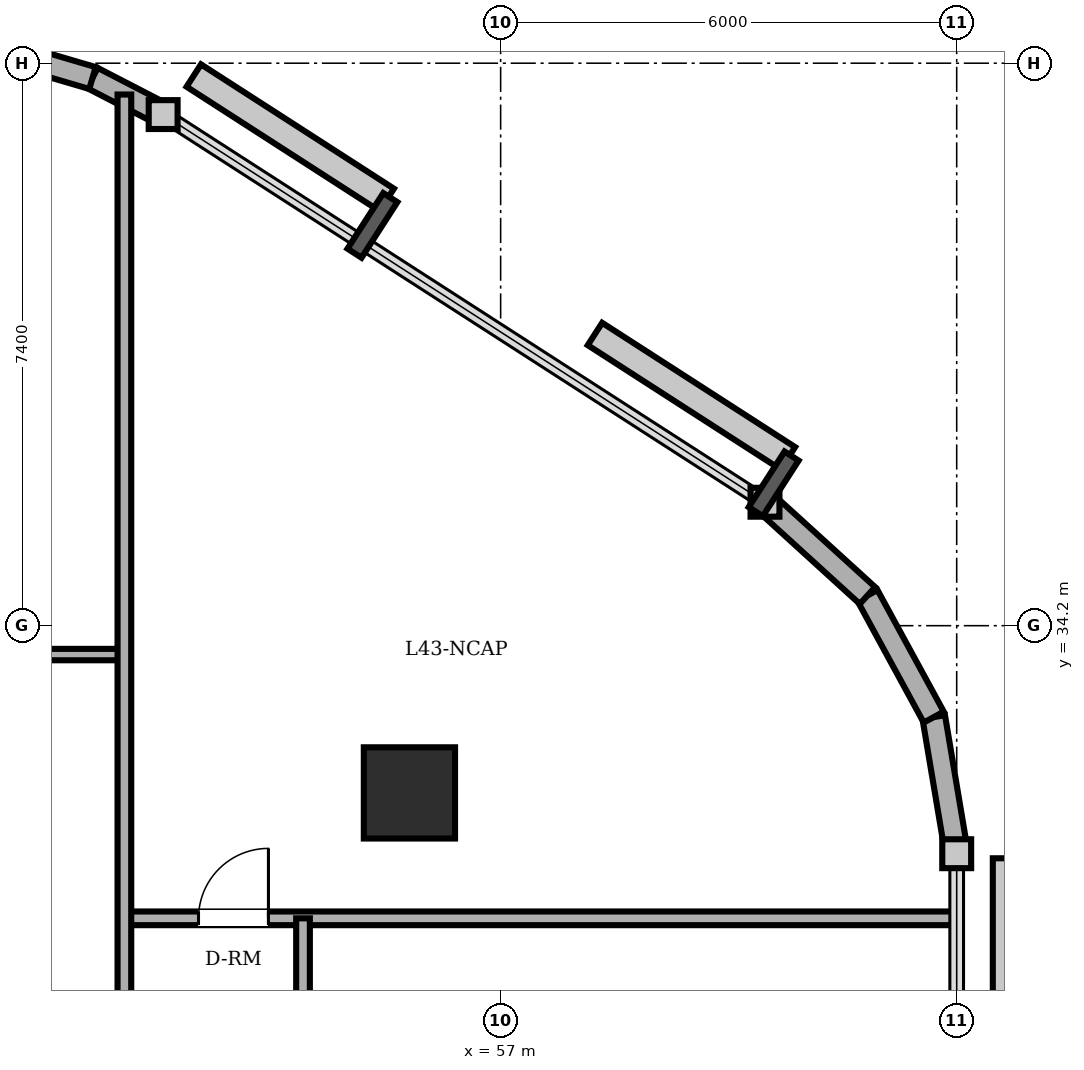
"""IFC4 building model, lengths in metres.
Left out: names, types, materials, properties, quantities, classifications, styles, units other than length and angle.
Written with IfcOpenShell. Run it as: python <this file> out.ifc"""

import sys

from ifc_helpers import new_model, si_unit, direction, frame, frame_2d, origin, origin_2d, place, context, subcontext, project, spatial, rectangle, circle, extrude, element, fill, save


model = new_model("IFC4")
c1 = context("Model", 3, precision=1e-05, world=origin(), true_north=direction((0.0, 1.0)))
c2 = subcontext(c1, "Body", "Model", "MODEL_VIEW")
j1 = project(units=[si_unit("LENGTHUNIT", "METRE"), si_unit("PLANEANGLEUNIT", "RADIAN")], contexts=[c1])
p1 = place(None, origin())
s1 = spatial("IfcSite", under=j1, at=p1, CompositionType="ELEMENT")
p2 = place(p1, origin())
s2 = spatial("IfcBuilding", under=s1, at=p2, CompositionType="ELEMENT")
p3 = place(p2, frame((0.0, 0.0, 165.4)))
s3 = spatial("IfcBuildingStorey", under=s2, at=p3, CompositionType="ELEMENT", Elevation=165.4)
p4 = place(p3, frame((55.8, 32.0, 0.0), z_axis=(0.0, 0.0, 1.0), x_axis=(1.0, 0.0, 0.0)))
e1 = element("IfcColumn", 1, at=p4, inside=s3, PredefinedType="COLUMN", context=c2, shape_type="SweptSolid", body=[
    extrude(circle(Radius=0.6, at=origin_2d()), origin(), (0.0, 0.0, 1.0), 3.6),
])
p5 = place(p3, frame((63.0, 31.2, 0.0), z_axis=(0.0, 0.0, 1.0), x_axis=(-0.165724081207, 0.986172159873, 0.0)))
e2 = element("IfcWall", 2, at=p5, inside=s3, PredefinedType="SOLIDWALL", context=c2, shape_type="SweptSolid", body=[
    extrude(rectangle(XDim=1.822, YDim=0.3, at=frame_2d((0.911, 0.0))), origin(), (0.0, 0.0, 1.0), 3.4),
])
p6 = place(p3, frame((62.698, 32.997, 0.0), z_axis=(0.0, 0.0, 1.0), x_axis=(-0.478608030646, 0.878028674362, 0.0)))
e3 = element("IfcWall", 3, at=p6, inside=s3, PredefinedType="SOLIDWALL", context=c2, shape_type="SweptSolid", body=[
    extrude(rectangle(XDim=1.822, YDim=0.3, at=frame_2d((0.911, 0.0))), origin(), (0.0, 0.0, 1.0), 3.4),
])
p7 = place(p3, frame((61.826, 34.597, 0.0), z_axis=(0.0, 0.0, 1.0), x_axis=(-0.73947929393, 0.673179302897, 0.0)))
e4 = element("IfcWall", 4, at=p7, inside=s3, PredefinedType="SOLIDWALL", context=c2, shape_type="SweptSolid", body=[
    extrude(rectangle(XDim=1.823, YDim=0.3, at=frame_2d((0.911, 0.0))), origin(), (0.0, 0.0, 1.0), 3.4),
])
p8 = place(p3, frame((52.56, 40.924, 0.0), z_axis=(0.0, 0.0, 1.0), x_axis=(-0.888283247196, 0.459296062198, 0.0)))
e5 = element("IfcWall", 5, at=p8, inside=s3, PredefinedType="SOLIDWALL", context=c2, shape_type="SweptSolid", body=[
    extrude(rectangle(XDim=1.047, YDim=0.3, at=frame_2d((0.523, 0.0))), origin(), (0.0, 0.0, 1.0), 3.4),
])
p9 = place(p3, frame((51.63, 41.405, 0.0), z_axis=(0.0, 0.0, 1.0), x_axis=(-0.959528674476, 0.281610942363, 0.0)))
e6 = element("IfcWall", 6, at=p9, inside=s3, PredefinedType="SOLIDWALL", context=c2, shape_type="SweptSolid", body=[
    extrude(rectangle(XDim=1.047, YDim=0.3, at=frame_2d((0.524, 0.0))), origin(), (0.0, 0.0, 1.0), 3.4),
])
p10 = place(p3, frame((52.05, 30.35, 0.0), z_axis=(0.0, 0.0, 1.0), x_axis=(1.0, 0.0, 0.0)))
e7 = element("IfcWall", 7, at=p10, inside=s3, PredefinedType="PARTITIONING", context=c2, shape_type="SweptSolid", body=[
    extrude(rectangle(XDim=10.95, YDim=0.18, at=frame_2d((5.475, 0.0))), origin(), (0.0, 0.0, 1.0), 3.4),
])
p11 = place(p10, frame((0.975, 0.0, 0.0)))
e8 = element("IfcOpeningElement", 8, at=p11, cuts=e7, PredefinedType="OPENING", context=c2, shape_type="SweptSolid", body=[
    extrude(rectangle(XDim=0.92, YDim=2.1, at=frame_2d((0.46, 1.05))), frame((0.0, 0.1, 0.0), z_axis=(0.0, -1.0, 0.0), x_axis=(1.0, 0.0, 0.0)), (0.0, 0.0, 1.0), 0.2),
])
p12 = place(p3, frame((39.85, 33.82, 0.0), z_axis=(0.0, 0.0, 1.0), x_axis=(1.0, 0.0, 0.0)))
e9 = element("IfcWall", 9, at=p12, inside=s3, PredefinedType="PARTITIONING", context=c2, shape_type="SweptSolid", body=[
    extrude(rectangle(XDim=12.2, YDim=0.15, at=frame_2d((6.1, 0.0))), origin(), (0.0, 0.0, 1.0), 2.932),
])
p13 = place(p3, frame((52.05, 14.18, 0.0), z_axis=(0.0, 0.0, 1.0), x_axis=(0.0, 1.0, 0.0)))
e10 = element("IfcWall", 10, at=p13, inside=s3, PredefinedType="PARTITIONING", context=c2, shape_type="SweptSolid", body=[
    extrude(rectangle(XDim=27.008, YDim=0.18, at=frame_2d((13.504, 0.0))), origin(), (0.0, 0.0, 1.0), 3.4),
])
p14 = place(p3, frame((54.4, 8.261, 0.0), z_axis=(0.0, 0.0, 1.0), x_axis=(0.0, 1.0, 0.0)))
e11 = element("IfcWall", 11, at=p14, inside=s3, PredefinedType="PARTITIONING", context=c2, shape_type="SweptSolid", body=[
    extrude(rectangle(XDim=22.089, YDim=0.18, at=frame_2d((11.044, 0.0))), origin(), (0.0, 0.0, 1.0), 3.4),
])
p15 = place(p14, frame((17.694, 0.0, 0.0)))
e12 = element("IfcOpeningElement", 12, at=p15, cuts=e11, PredefinedType="OPENING", context=c2, shape_type="SweptSolid", body=[
    extrude(rectangle(XDim=0.92, YDim=2.1, at=frame_2d((0.46, 1.05))), frame((0.0, 0.1, 0.0), z_axis=(0.0, -1.0, 0.0), x_axis=(1.0, 0.0, 0.0)), (0.0, 0.0, 1.0), 0.2),
])
p16 = place(p14, frame((10.771, 0.0, 0.0)))
e13 = element("IfcOpeningElement", 13, at=p16, cuts=e11, PredefinedType="OPENING", context=c2, shape_type="SweptSolid", body=[
    extrude(rectangle(XDim=0.92, YDim=2.1, at=frame_2d((0.46, 1.05))), frame((0.0, 0.1, 0.0), z_axis=(0.0, -1.0, 0.0), x_axis=(1.0, 0.0, 0.0)), (0.0, 0.0, 1.0), 0.2),
])
p17 = place(p11, origin())
e14 = element("IfcDoor", 14, at=p17, inside=s3, OperationType="SINGLE_SWING_RIGHT", PredefinedType="DOOR", context=c2, shape_type="SweptSolid", body=[
    extrude(rectangle(XDim=0.92, YDim=2.1, at=frame_2d((0.46, 1.05))), frame((0.0, 0.025, 0.0), z_axis=(0.0, -1.0, 0.0), x_axis=(1.0, 0.0, 0.0)), (0.0, 0.0, 1.0), 0.05),
])
fill(e8, e14)
save(model, sys.argv[1])
